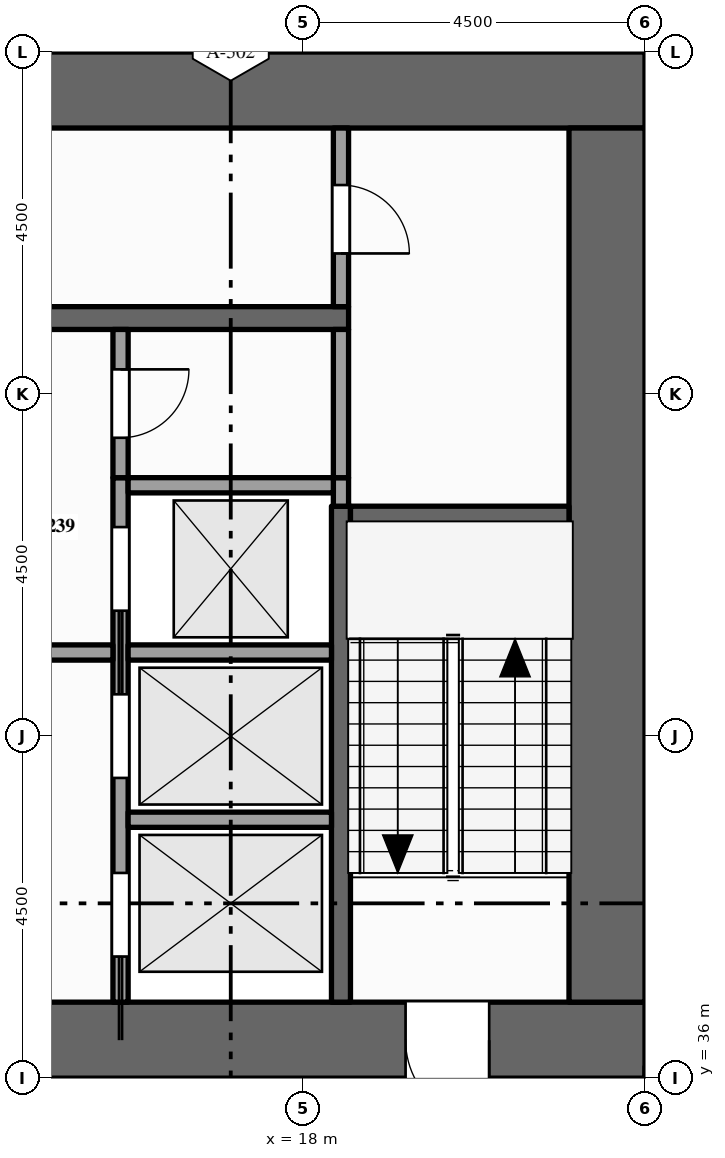
"""IFC4 building model, lengths in metres.
Left out: names, types, materials, properties, quantities, classifications, styles, units other than length and angle.
Written with IfcOpenShell. Run it as: python <this file> out.ifc"""

import sys

from ifc_helpers import new_model, si_unit, direction, frame, frame_2d, origin, place, context, subcontext, project, spatial, rectangle, extrude, element, fill, save


model = new_model("IFC4")
c1 = context("Model", 3, precision=1e-05, world=origin(), true_north=direction((0.0, 1.0)))
c2 = subcontext(c1, "Body", "Model", "MODEL_VIEW")
j1 = project(units=[si_unit("LENGTHUNIT", "METRE"), si_unit("PLANEANGLEUNIT", "RADIAN")], contexts=[c1])
p1 = place(None, origin())
s1 = spatial("IfcSite", under=j1, at=p1, CompositionType="ELEMENT")
p2 = place(p1, origin())
s2 = spatial("IfcBuilding", under=s1, at=p2, CompositionType="ELEMENT")
p3 = place(p2, frame((0.0, 0.0, 215.0)))
s3 = spatial("IfcBuildingStorey", under=s2, at=p3, CompositionType="ELEMENT", Elevation=215.0)
p4 = place(p3, frame((0.0, 36.5, -0.15), z_axis=(0.0, 0.0, 1.0), x_axis=(1.0, 0.0, 0.0)))
e1 = element("IfcWall", 1, at=p4, inside=s3, PredefinedType="SHEAR", context=c2, shape_type="SweptSolid", body=[
    extrude(rectangle(XDim=22.5, YDim=1.0, at=frame_2d((11.25, 0.0))), origin(), (0.0, 0.0, 1.0), 4.0),
])
p5 = place(p4, frame((7.1, 0.0, 0.15)))
e2 = element("IfcOpeningElement", 2, at=p5, cuts=e1, PredefinedType="OPENING", context=c2, shape_type="SweptSolid", body=[
    extrude(rectangle(XDim=1.8, YDim=2.1, at=frame_2d((0.9, 1.05))), frame((0.0, 0.51, 0.0), z_axis=(0.0, -1.0, 0.0), x_axis=(1.0, 0.0, 0.0)), (0.0, 0.0, 1.0), 1.02),
])
p6 = place(p4, frame((13.15, 0.0, 0.15)))
e3 = element("IfcOpeningElement", 3, at=p6, cuts=e1, PredefinedType="OPENING", context=c2, shape_type="SweptSolid", body=[
    extrude(rectangle(XDim=1.1, YDim=2.1, at=frame_2d((0.55, 1.05))), frame((0.0, 0.51, 0.0), z_axis=(0.0, -1.0, 0.0), x_axis=(1.0, 0.0, 0.0)), (0.0, 0.0, 1.0), 1.02),
])
p7 = place(p4, frame((2.15, 0.0, 0.15)))
e4 = element("IfcOpeningElement", 4, at=p7, cuts=e1, PredefinedType="OPENING", context=c2, shape_type="SweptSolid", body=[
    extrude(rectangle(XDim=1.1, YDim=2.1, at=frame_2d((0.55, 1.05))), frame((0.0, 0.51, 0.0), z_axis=(0.0, -1.0, 0.0), x_axis=(1.0, 0.0, 0.0)), (0.0, 0.0, 1.0), 1.02),
])
p8 = place(p4, frame((19.35, 0.0, 0.15)))
e5 = element("IfcOpeningElement", 5, at=p8, cuts=e1, PredefinedType="OPENING", context=c2, shape_type="SweptSolid", body=[
    extrude(rectangle(XDim=1.1, YDim=2.1, at=frame_2d((0.55, 1.05))), frame((0.0, 0.51, 0.0), z_axis=(0.0, -1.0, 0.0), x_axis=(1.0, 0.0, 0.0)), (0.0, 0.0, 1.0), 1.02),
])
p9 = place(p3, frame((0.0, 49.0, -0.15), z_axis=(0.0, 0.0, 1.0), x_axis=(1.0, 0.0, 0.0)))
e6 = element("IfcWall", 6, at=p9, inside=s3, PredefinedType="SHEAR", context=c2, shape_type="SweptSolid", body=[
    extrude(rectangle(XDim=22.5, YDim=1.0, at=frame_2d((11.25, 0.0))), origin(), (0.0, 0.0, 1.0), 4.0),
])
p10 = place(p3, frame((22.0, 37.0, -0.15), z_axis=(0.0, 0.0, 1.0), x_axis=(0.0, 1.0, 0.0)))
e7 = element("IfcWall", 7, at=p10, inside=s3, PredefinedType="SHEAR", context=c2, shape_type="SweptSolid", body=[
    extrude(rectangle(XDim=11.5, YDim=1.0, at=frame_2d((5.75, 0.0))), origin(), (0.0, 0.0, 1.0), 4.0),
])
p11 = place(p3, frame((15.6, 37.0, 0.0), z_axis=(0.0, 0.0, 1.0), x_axis=(0.0, 1.0, 0.0)))
e8 = element("IfcWall", 8, at=p11, inside=s3, PredefinedType="SOLIDWALL", context=c2, shape_type="SweptSolid", body=[
    extrude(rectangle(XDim=6.9, YDim=0.2, at=frame_2d((3.45, 0.0))), origin(), (0.0, 0.0, 1.0), 3.85),
])
p12 = place(p11, frame((0.6, 0.0, 0.012)))
e9 = element("IfcOpeningElement", 9, at=p12, cuts=e8, PredefinedType="OPENING", context=c2, shape_type="SweptSolid", body=[
    extrude(rectangle(XDim=1.1, YDim=2.1, at=frame_2d((0.55, 1.05))), frame((0.0, 0.11, 0.0), z_axis=(0.0, -1.0, 0.0), x_axis=(1.0, 0.0, 0.0)), (0.0, 0.0, 1.0), 0.22),
])
p13 = place(p11, frame((2.95, 0.0, 0.012)))
e10 = element("IfcOpeningElement", 10, at=p13, cuts=e8, PredefinedType="OPENING", context=c2, shape_type="SweptSolid", body=[
    extrude(rectangle(XDim=1.1, YDim=2.1, at=frame_2d((0.55, 1.05))), frame((0.0, 0.11, 0.0), z_axis=(0.0, -1.0, 0.0), x_axis=(1.0, 0.0, 0.0)), (0.0, 0.0, 1.0), 0.22),
])
p14 = place(p11, frame((5.15, 0.0, 0.012)))
e11 = element("IfcOpeningElement", 11, at=p14, cuts=e8, PredefinedType="OPENING", context=c2, shape_type="SweptSolid", body=[
    extrude(rectangle(XDim=1.1, YDim=2.1, at=frame_2d((0.55, 1.05))), frame((0.0, 0.11, 0.0), z_axis=(0.0, -1.0, 0.0), x_axis=(1.0, 0.0, 0.0)), (0.0, 0.0, 1.0), 0.22),
])
p15 = place(p3, frame((15.6, 43.9, 0.0), z_axis=(0.0, 0.0, 1.0), x_axis=(0.0, 1.0, 0.0)))
e12 = element("IfcWall", 12, at=p15, inside=s3, PredefinedType="PARTITIONING", context=c2, shape_type="SweptSolid", body=[
    extrude(rectangle(XDim=1.95, YDim=0.2, at=frame_2d((0.975, 0.0))), origin(), (0.0, 0.0, 1.0), 3.85),
])
p16 = place(p15, frame((0.525, 0.0, 0.0)))
e13 = element("IfcOpeningElement", 13, at=p16, cuts=e12, PredefinedType="OPENING", context=c2, shape_type="SweptSolid", body=[
    extrude(rectangle(XDim=0.9, YDim=2.1, at=frame_2d((0.45, 1.05))), frame((0.0, 0.11, 0.0), z_axis=(0.0, -1.0, 0.0), x_axis=(1.0, 0.0, 0.0)), (0.0, 0.0, 1.0), 0.22),
])
p17 = place(p3, frame((18.5, 37.0, 0.0), z_axis=(0.0, 0.0, 1.0), x_axis=(0.0, 1.0, 0.0)))
e14 = element("IfcWall", 14, at=p17, inside=s3, PredefinedType="SHEAR", context=c2, shape_type="SweptSolid", body=[
    extrude(rectangle(XDim=6.525, YDim=0.25, at=frame_2d((3.262, 0.0))), origin(), (0.0, 0.0, 1.0), 3.85),
])
p18 = place(p3, frame((18.5, 43.525, 0.0), z_axis=(0.0, 0.0, 1.0), x_axis=(0.0, 1.0, 0.0)))
e15 = element("IfcWall", 15, at=p18, inside=s3, PredefinedType="SOLIDWALL", context=c2, shape_type="SweptSolid", body=[
    extrude(rectangle(XDim=0.375, YDim=0.2, at=frame_2d((0.188, 0.0))), origin(), (0.0, 0.0, 1.0), 3.85),
])
p19 = place(p3, frame((18.5, 43.9, 0.0), z_axis=(0.0, 0.0, 1.0), x_axis=(0.0, 1.0, 0.0)))
e16 = element("IfcWall", 16, at=p19, inside=s3, PredefinedType="PARTITIONING", context=c2, shape_type="SweptSolid", body=[
    extrude(rectangle(XDim=1.95, YDim=0.2, at=frame_2d((0.975, 0.0))), origin(), (0.0, 0.0, 1.0), 3.85),
])
p20 = place(p3, frame((18.5, 46.15, 0.0), z_axis=(0.0, 0.0, 1.0), x_axis=(0.0, 1.0, 0.0)))
e17 = element("IfcWall", 17, at=p20, inside=s3, PredefinedType="PARTITIONING", context=c2, shape_type="SweptSolid", body=[
    extrude(rectangle(XDim=2.35, YDim=0.2, at=frame_2d((1.175, 0.0))), origin(), (0.0, 0.0, 1.0), 3.85),
])
p21 = place(p20, frame((0.7, 0.0, 0.0)))
e18 = element("IfcOpeningElement", 18, at=p21, cuts=e17, PredefinedType="OPENING", context=c2, shape_type="SweptSolid", body=[
    extrude(rectangle(XDim=0.9, YDim=2.1, at=frame_2d((0.45, 1.05))), frame((0.0, 0.11, 0.0), z_axis=(0.0, -1.0, 0.0), x_axis=(1.0, 0.0, 0.0)), (0.0, 0.0, 1.0), 0.22),
])
p22 = place(p3, frame((15.7, 39.4, 0.0), z_axis=(0.0, 0.0, 1.0), x_axis=(1.0, 0.0, 0.0)))
e19 = element("IfcWall", 19, at=p22, inside=s3, PredefinedType="SOLIDWALL", context=c2, shape_type="SweptSolid", body=[
    extrude(rectangle(XDim=2.675, YDim=0.2, at=frame_2d((1.337, 0.0))), origin(), (0.0, 0.0, 1.0), 3.85),
])
p23 = place(p3, frame((11.9, 41.6, 0.0), z_axis=(0.0, 0.0, 1.0), x_axis=(1.0, 0.0, 0.0)))
e20 = element("IfcWall", 20, at=p23, inside=s3, PredefinedType="PARTITIONING", context=c2, shape_type="SweptSolid", body=[
    extrude(rectangle(XDim=3.6, YDim=0.2, at=frame_2d((1.8, 0.0))), origin(), (0.0, 0.0, 1.0), 3.85),
])
p24 = place(p23, frame((1.3, 0.0, 0.0)))
e21 = element("IfcOpeningElement", 21, at=p24, cuts=e20, PredefinedType="OPENING", context=c2, shape_type="SweptSolid", body=[
    extrude(rectangle(XDim=1.0, YDim=2.1, at=frame_2d((0.5, 1.05))), frame((0.0, 0.11, 0.0), z_axis=(0.0, -1.0, 0.0), x_axis=(1.0, 0.0, 0.0)), (0.0, 0.0, 1.0), 0.22),
])
p25 = place(p3, frame((15.7, 41.6, 0.0), z_axis=(0.0, 0.0, 1.0), x_axis=(1.0, 0.0, 0.0)))
e22 = element("IfcWall", 22, at=p25, inside=s3, PredefinedType="SOLIDWALL", context=c2, shape_type="SweptSolid", body=[
    extrude(rectangle(XDim=2.675, YDim=0.2, at=frame_2d((1.337, 0.0))), origin(), (0.0, 0.0, 1.0), 3.85),
])
p26 = place(p3, frame((18.625, 43.4, 0.0), z_axis=(0.0, 0.0, 1.0), x_axis=(1.0, 0.0, 0.0)))
e23 = element("IfcWall", 23, at=p26, inside=s3, PredefinedType="SHEAR", context=c2, shape_type="SweptSolid", body=[
    extrude(rectangle(XDim=2.875, YDim=0.25, at=frame_2d((1.438, 0.0))), origin(), (0.0, 0.0, 1.0), 3.85),
])
p27 = place(p3, frame((15.7, 43.8, 0.0), z_axis=(0.0, 0.0, 1.0), x_axis=(1.0, 0.0, 0.0)))
e24 = element("IfcWall", 24, at=p27, inside=s3, PredefinedType="SOLIDWALL", context=c2, shape_type="SweptSolid", body=[
    extrude(rectangle(XDim=2.7, YDim=0.2, at=frame_2d((1.35, 0.0))), origin(), (0.0, 0.0, 1.0), 3.85),
])
p28 = place(p3, frame((4.1, 46.0, 0.0), z_axis=(0.0, 0.0, 1.0), x_axis=(1.0, 0.0, 0.0)))
e25 = element("IfcWall", 25, at=p28, inside=s3, PredefinedType="SHEAR", context=c2, shape_type="SweptSolid", body=[
    extrude(rectangle(XDim=14.5, YDim=0.3, at=frame_2d((7.25, 0.0))), origin(), (0.0, 0.0, 1.0), 3.85),
])
p29 = place(p28, frame((3.4, 0.0, 0.0)))
e26 = element("IfcOpeningElement", 26, at=p29, cuts=e25, PredefinedType="OPENING", context=c2, shape_type="SweptSolid", body=[
    extrude(rectangle(XDim=1.0, YDim=2.1, at=frame_2d((0.5, 1.05))), frame((0.0, 0.16, 0.0), z_axis=(0.0, -1.0, 0.0), x_axis=(1.0, 0.0, 0.0)), (0.0, 0.0, 1.0), 0.32),
])
p30 = place(p28, frame((9.1, 0.0, 0.0)))
e27 = element("IfcOpeningElement", 27, at=p30, cuts=e25, PredefinedType="OPENING", context=c2, shape_type="SweptSolid", body=[
    extrude(rectangle(XDim=1.0, YDim=2.1, at=frame_2d((0.5, 1.05))), frame((0.0, 0.16, 0.0), z_axis=(0.0, -1.0, 0.0), x_axis=(1.0, 0.0, 0.0)), (0.0, 0.0, 1.0), 0.32),
])
p31 = place(p12, origin())
e28 = element("IfcDoor", 28, at=p31, inside=s3, OperationType="SLIDING_TO_LEFT", PredefinedType="DOOR", context=c2, shape_type="SweptSolid", body=[
    extrude(rectangle(XDim=1.1, YDim=2.1, at=frame_2d((0.55, 1.05))), frame((0.0, 0.025, 0.0), z_axis=(0.0, -1.0, 0.0), x_axis=(1.0, 0.0, 0.0)), (0.0, 0.0, 1.0), 0.05),
])
fill(e9, e28)
p32 = place(p13, origin())
e29 = element("IfcDoor", 29, at=p32, inside=s3, OperationType="SLIDING_TO_RIGHT", PredefinedType="DOOR", context=c2, shape_type="SweptSolid", body=[
    extrude(rectangle(XDim=1.1, YDim=2.1, at=frame_2d((0.55, 1.05))), frame((0.0, 0.025, 0.0), z_axis=(0.0, -1.0, 0.0), x_axis=(1.0, 0.0, 0.0)), (0.0, 0.0, 1.0), 0.05),
])
fill(e10, e29)
p33 = place(p14, origin())
e30 = element("IfcDoor", 30, at=p33, inside=s3, OperationType="SLIDING_TO_LEFT", PredefinedType="DOOR", context=c2, shape_type="SweptSolid", body=[
    extrude(rectangle(XDim=1.1, YDim=2.1, at=frame_2d((0.55, 1.05))), frame((0.0, 0.025, 0.0), z_axis=(0.0, -1.0, 0.0), x_axis=(1.0, 0.0, 0.0)), (0.0, 0.0, 1.0), 0.05),
])
fill(e11, e30)
p34 = place(p8, origin())
e31 = element("IfcDoor", 31, at=p34, inside=s3, OperationType="SINGLE_SWING_RIGHT", PredefinedType="DOOR", context=c2, shape_type="SweptSolid", body=[
    extrude(rectangle(XDim=1.1, YDim=2.1, at=frame_2d((0.55, 1.05))), frame((0.0, 0.025, 0.0), z_axis=(0.0, -1.0, 0.0), x_axis=(1.0, 0.0, 0.0)), (0.0, 0.0, 1.0), 0.05),
])
fill(e5, e31)
p35 = place(p21, origin())
e32 = element("IfcDoor", 32, at=p35, inside=s3, OperationType="SINGLE_SWING_LEFT", PredefinedType="DOOR", context=c2, shape_type="SweptSolid", body=[
    extrude(rectangle(XDim=0.9, YDim=2.1, at=frame_2d((0.45, 1.05))), frame((0.0, 0.025, 0.0), z_axis=(0.0, -1.0, 0.0), x_axis=(1.0, 0.0, 0.0)), (0.0, 0.0, 1.0), 0.05),
])
fill(e18, e32)
p36 = place(p16, origin())
e33 = element("IfcDoor", 33, at=p36, inside=s3, OperationType="SINGLE_SWING_RIGHT", PredefinedType="DOOR", context=c2, shape_type="SweptSolid", body=[
    extrude(rectangle(XDim=0.9, YDim=2.1, at=frame_2d((0.45, 1.05))), frame((0.0, 0.025, 0.0), z_axis=(0.0, -1.0, 0.0), x_axis=(1.0, 0.0, 0.0)), (0.0, 0.0, 1.0), 0.05),
])
fill(e13, e33)
save(model, sys.argv[1])
